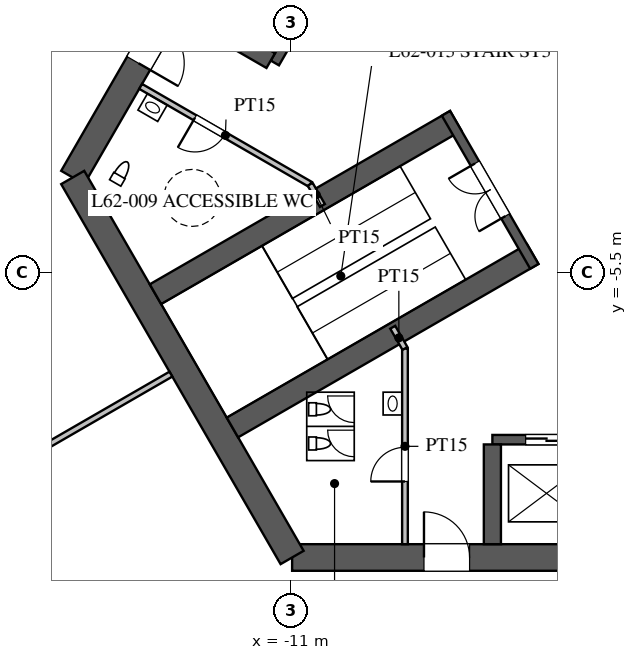
"""IFC4 building model, lengths in metres.
Left out: names, types, materials, properties, quantities, classifications, styles, units other than length and angle.
Written with IfcOpenShell. Run it as: python <this file> out.ifc"""

import sys

from ifc_helpers import new_model, si_unit, direction, frame, frame_2d, origin, place, context, subcontext, project, spatial, rectangle, extrude, element, fill, save


model = new_model("IFC4")
c1 = context("Model", 3, precision=1e-05, world=origin(), true_north=direction((0.0, 1.0)))
c2 = subcontext(c1, "Body", "Model", "MODEL_VIEW")
j1 = project(units=[si_unit("LENGTHUNIT", "METRE"), si_unit("PLANEANGLEUNIT", "RADIAN")], contexts=[c1])
p1 = place(None, origin())
s1 = spatial("IfcSite", under=j1, at=p1, CompositionType="ELEMENT")
p2 = place(p1, origin())
s2 = spatial("IfcBuilding", under=s1, at=p2, CompositionType="ELEMENT")
p3 = place(p2, frame((0.0, 0.0, 271.3)))
s3 = spatial("IfcBuildingStorey", under=s2, at=p3, CompositionType="ELEMENT", Elevation=271.3)
p4 = place(p3, frame((-10.97, -13.0, 0.0), z_axis=(0.0, 0.0, 1.0), x_axis=(1.0, 0.0, 0.0)))
e1 = element("IfcWall", 1, at=p4, inside=s3, PredefinedType="SHEAR", context=c2, shape_type="SweptSolid", body=[
    extrude(rectangle(XDim=21.939, YDim=0.7, at=frame_2d((10.97, 0.0))), origin(), (0.0, 0.0, 1.0), 5.0),
])
p5 = place(p4, frame((17.27, 0.0, 0.0)))
e2 = element("IfcOpeningElement", 2, at=p5, cuts=e1, PredefinedType="OPENING", context=c2, shape_type="SweptSolid", body=[
    extrude(rectangle(XDim=1.2, YDim=2.1, at=frame_2d((0.6, 1.05))), frame((0.0, 0.36, 0.0), z_axis=(0.0, -1.0, 0.0), x_axis=(1.0, 0.0, 0.0)), (0.0, 0.0, 1.0), 0.72),
])
p6 = place(p4, frame((3.47, 0.0, 0.0)))
e3 = element("IfcOpeningElement", 3, at=p6, cuts=e1, PredefinedType="OPENING", context=c2, shape_type="SweptSolid", body=[
    extrude(rectangle(XDim=1.2, YDim=2.1, at=frame_2d((0.6, 1.05))), frame((0.0, 0.36, 0.0), z_axis=(0.0, -1.0, 0.0), x_axis=(1.0, 0.0, 0.0)), (0.0, 0.0, 1.0), 0.72),
])
p7 = place(p3, frame((-5.773, 16.0, 0.0), z_axis=(0.0, 0.0, 1.0), x_axis=(-0.500002442456, -0.866023993627, 0.0)))
e4 = element("IfcWall", 4, at=p7, inside=s3, PredefinedType="SHEAR", context=c2, shape_type="SweptSolid", body=[
    extrude(rectangle(XDim=21.939, YDim=0.7, at=frame_2d((10.97, 0.0))), origin(), (0.0, 0.0, 1.0), 5.0),
])
p8 = place(p7, frame((17.27, 0.0, 0.0)))
e5 = element("IfcOpeningElement", 5, at=p8, cuts=e4, PredefinedType="OPENING", context=c2, shape_type="SweptSolid", body=[
    extrude(rectangle(XDim=1.2, YDim=2.1, at=frame_2d((0.6, 1.05))), frame((0.0, 0.36, 0.0), z_axis=(0.0, -1.0, 0.0), x_axis=(1.0, 0.0, 0.0)), (0.0, 0.0, 1.0), 0.72),
])
p9 = place(p7, frame((3.47, 0.0, 0.0)))
e6 = element("IfcOpeningElement", 6, at=p9, cuts=e4, PredefinedType="OPENING", context=c2, shape_type="SweptSolid", body=[
    extrude(rectangle(XDim=1.2, YDim=2.1, at=frame_2d((0.6, 1.05))), frame((0.0, 0.36, 0.0), z_axis=(0.0, -1.0, 0.0), x_axis=(1.0, 0.0, 0.0)), (0.0, 0.0, 1.0), 0.72),
])
p10 = place(p3, frame((-16.743, -3.0, 0.0), z_axis=(0.0, 0.0, 1.0), x_axis=(0.499995765644, -0.866027848477, 0.0)))
e7 = element("IfcWall", 7, at=p10, inside=s3, PredefinedType="SHEAR", context=c2, shape_type="SweptSolid", body=[
    extrude(rectangle(XDim=11.547, YDim=0.7, at=frame_2d((5.773, 0.0))), origin(), (0.0, 0.0, 1.0), 5.0),
])
p11 = place(p3, frame((-5.7, -9.9, 0.0), z_axis=(0.0, 0.0, 1.0), x_axis=(1.0, 0.0, 0.0)))
e8 = element("IfcWall", 8, at=p11, inside=s3, PredefinedType="SHEAR", context=c2, shape_type="SweptSolid", body=[
    extrude(rectangle(XDim=11.4, YDim=0.25, at=frame_2d((5.7, 0.0))), origin(), (0.0, 0.0, 1.0), 5.0),
])
p12 = place(p11, frame((0.875, 0.0, 0.0)))
e9 = element("IfcOpeningElement", 9, at=p12, cuts=e8, PredefinedType="OPENING", context=c2, shape_type="SweptSolid", body=[
    extrude(rectangle(XDim=1.1, YDim=2.2, at=frame_2d((0.55, 1.1))), frame((0.0, 0.135, 0.0), z_axis=(0.0, -1.0, 0.0), x_axis=(1.0, 0.0, 0.0)), (0.0, 0.0, 1.0), 0.27),
])
p13 = place(p11, frame((3.725, 0.0, 0.0)))
e10 = element("IfcOpeningElement", 10, at=p13, cuts=e8, PredefinedType="OPENING", context=c2, shape_type="SweptSolid", body=[
    extrude(rectangle(XDim=1.1, YDim=2.2, at=frame_2d((0.55, 1.1))), frame((0.0, 0.135, 0.0), z_axis=(0.0, -1.0, 0.0), x_axis=(1.0, 0.0, 0.0)), (0.0, 0.0, 1.0), 0.27),
])
p14 = place(p11, frame((6.575, 0.0, 0.0)))
e11 = element("IfcOpeningElement", 11, at=p14, cuts=e8, PredefinedType="OPENING", context=c2, shape_type="SweptSolid", body=[
    extrude(rectangle(XDim=1.1, YDim=2.2, at=frame_2d((0.55, 1.1))), frame((0.0, 0.135, 0.0), z_axis=(0.0, -1.0, 0.0), x_axis=(1.0, 0.0, 0.0)), (0.0, 0.0, 1.0), 0.27),
])
p15 = place(p11, frame((9.425, 0.0, 0.0)))
e12 = element("IfcOpeningElement", 12, at=p15, cuts=e8, PredefinedType="OPENING", context=c2, shape_type="SweptSolid", body=[
    extrude(rectangle(XDim=1.1, YDim=2.2, at=frame_2d((0.55, 1.1))), frame((0.0, 0.135, 0.0), z_axis=(0.0, -1.0, 0.0), x_axis=(1.0, 0.0, 0.0)), (0.0, 0.0, 1.0), 0.27),
])
p16 = place(p3, frame((-5.7, -10.025, 0.0), z_axis=(0.0, 0.0, 1.0), x_axis=(0.0, -1.0, 0.0)))
e13 = element("IfcWall", 13, at=p16, inside=s3, PredefinedType="SHEAR", context=c2, shape_type="SweptSolid", body=[
    extrude(rectangle(XDim=2.625, YDim=0.45, at=frame_2d((1.312, 0.0))), origin(), (0.0, 0.0, 1.0), 5.0),
])
p17 = place(p3, frame((-5.724, 9.886, 0.0), z_axis=(0.0, 0.0, 1.0), x_axis=(-0.500001763848, -0.866024385424, 0.0)))
e14 = element("IfcWall", 14, at=p17, inside=s3, PredefinedType="SHEAR", context=c2, shape_type="SweptSolid", body=[
    extrude(rectangle(XDim=11.4, YDim=0.25, at=frame_2d((5.7, 0.0))), origin(), (0.0, 0.0, 1.0), 5.0),
])
p18 = place(p17, frame((0.875, 0.0, 0.0)))
e15 = element("IfcOpeningElement", 15, at=p18, cuts=e14, PredefinedType="OPENING", context=c2, shape_type="SweptSolid", body=[
    extrude(rectangle(XDim=1.1, YDim=2.2, at=frame_2d((0.55, 1.1))), frame((0.0, 0.135, 0.0), z_axis=(0.0, -1.0, 0.0), x_axis=(1.0, 0.0, 0.0)), (0.0, 0.0, 1.0), 0.27),
])
p19 = place(p17, frame((3.725, 0.0, 0.0)))
e16 = element("IfcOpeningElement", 16, at=p19, cuts=e14, PredefinedType="OPENING", context=c2, shape_type="SweptSolid", body=[
    extrude(rectangle(XDim=1.1, YDim=2.2, at=frame_2d((0.55, 1.1))), frame((0.0, 0.135, 0.0), z_axis=(0.0, -1.0, 0.0), x_axis=(1.0, 0.0, 0.0)), (0.0, 0.0, 1.0), 0.27),
])
p20 = place(p17, frame((6.525, 0.0, 0.0)))
e17 = element("IfcOpeningElement", 17, at=p20, cuts=e14, PredefinedType="OPENING", context=c2, shape_type="SweptSolid", body=[
    extrude(rectangle(XDim=1.2, YDim=2.2, at=frame_2d((0.6, 1.1))), frame((0.0, 0.135, 0.0), z_axis=(0.0, -1.0, 0.0), x_axis=(1.0, 0.0, 0.0)), (0.0, 0.0, 1.0), 0.27),
])
p21 = place(p17, frame((9.375, 0.0, 0.0)))
e18 = element("IfcOpeningElement", 18, at=p21, cuts=e14, PredefinedType="OPENING", context=c2, shape_type="SweptSolid", body=[
    extrude(rectangle(XDim=1.2, YDim=2.2, at=frame_2d((0.6, 1.1))), frame((0.0, 0.135, 0.0), z_axis=(0.0, -1.0, 0.0), x_axis=(1.0, 0.0, 0.0)), (0.0, 0.0, 1.0), 0.27),
])
p22 = place(p3, frame((-11.532, 0.076, 0.0), z_axis=(0.0, 0.0, 1.0), x_axis=(-0.866013657776, 0.500020344131, 0.0)))
e19 = element("IfcWall", 19, at=p22, inside=s3, PredefinedType="SHEAR", context=c2, shape_type="SweptSolid", body=[
    extrude(rectangle(XDim=2.625, YDim=0.45, at=frame_2d((1.312, 0.0))), origin(), (0.0, 0.0, 1.0), 5.0),
])
for number, where, z_axis, x_axis in (
    (20, (-6.663, -1.509, 0.0), (0.0, 0.0, 1.0), (-0.866, -0.5, 0.0)),
    (21, (-4.638, -5.016, 0.0), (0.0, 0.0, 1.0), (-0.866, -0.5, 0.0)),
):
    element("IfcWall", number, at=place(p3, frame(where, z_axis=z_axis, x_axis=x_axis)), inside=s3, PredefinedType="SHEAR", context=c2, shape_type="SweptSolid", body=[
        extrude(rectangle(XDim=9.125, YDim=0.6, at=frame_2d((4.562, 0.0))), origin(), (0.0, 0.0, 1.0), 5.0),
    ])
p23 = place(p3, frame((-6.922, -1.312, 0.0), z_axis=(0.0, 0.0, 1.0), x_axis=(0.499984536904, -0.866034331223, 0.0)))
e22 = element("IfcWall", 22, at=p23, inside=s3, PredefinedType="SHEAR", context=c2, shape_type="SweptSolid", body=[
    extrude(rectangle(XDim=4.65, YDim=0.25, at=frame_2d((2.325, 0.0))), origin(), (0.0, 0.0, 1.0), 5.0),
])
p24 = place(p23, frame((1.525, 0.0, 0.0)))
e23 = element("IfcOpeningElement", 23, at=p24, cuts=e22, PredefinedType="OPENING", context=c2, shape_type="SweptSolid", body=[
    extrude(rectangle(XDim=1.6, YDim=2.1, at=frame_2d((0.8, 1.05))), frame((0.0, 0.135, 0.0), z_axis=(0.0, -1.0, 0.0), x_axis=(1.0, 0.0, 0.0)), (0.0, 0.0, 1.0), 0.27),
])
p25 = place(p3, frame((-8.0, -7.5, 0.0), z_axis=(0.0, 0.0, 1.0), x_axis=(0.0, -1.0, 0.0)))
e24 = element("IfcWall", 24, at=p25, inside=s3, PredefinedType="PARTITIONING", context=c2, shape_type="SweptSolid", body=[
    extrude(rectangle(XDim=5.15, YDim=0.15, at=frame_2d((2.575, 0.0))), origin(), (0.0, 0.0, 1.0), 4.8),
])
p26 = place(p25, frame((2.6, 0.0, 0.0)))
e25 = element("IfcOpeningElement", 25, at=p26, cuts=e24, PredefinedType="OPENING", context=c2, shape_type="SweptSolid", body=[
    extrude(rectangle(XDim=0.9, YDim=2.1, at=frame_2d((0.45, 1.05))), frame((0.0, 0.085, 0.0), z_axis=(0.0, -1.0, 0.0), x_axis=(1.0, 0.0, 0.0)), (0.0, 0.0, 1.0), 0.17),
])
p27 = place(p3, frame((-10.495, -3.178, 0.0), z_axis=(0.0, 0.0, 1.0), x_axis=(-0.866037967349, 0.499978238636, 0.0)))
e26 = element("IfcWall", 26, at=p27, inside=s3, PredefinedType="PARTITIONING", context=c2, shape_type="SweptSolid", body=[
    extrude(rectangle(XDim=5.15, YDim=0.15, at=frame_2d((2.575, 0.0))), origin(), (0.0, 0.0, 1.0), 4.8),
])
p28 = place(p27, frame((2.6, 0.0, 0.0)))
e27 = element("IfcOpeningElement", 27, at=p28, cuts=e26, PredefinedType="OPENING", context=c2, shape_type="SweptSolid", body=[
    extrude(rectangle(XDim=0.9, YDim=2.1, at=frame_2d((0.45, 1.05))), frame((0.0, 0.085, 0.0), z_axis=(0.0, -1.0, 0.0), x_axis=(1.0, 0.0, 0.0)), (0.0, 0.0, 1.0), 0.17),
])
for number, where, z_axis, x_axis in (
    (28, (-10.495, -3.178, 0.0), (0.0, 0.0, 1.0), (0.5, -0.866, 0.0)),
    (29, (-8.0, -7.5, 0.0), (0.0, 0.0, 1.0), (-0.5, 0.866, 0.0)),
):
    element("IfcWall", number, at=place(p3, frame(where, z_axis=z_axis, x_axis=x_axis)), inside=s3, PredefinedType="PARTITIONING", context=c2, shape_type="SweptSolid", body=[
        extrude(rectangle(XDim=0.645, YDim=0.15, at=frame_2d((0.323, 0.0))), origin(), (0.0, 0.0, 1.0), 4.8),
    ])
p29 = place(p3, frame((-14.159, -8.175, 0.0), z_axis=(0.0, 0.0, 1.0), x_axis=(-0.866026905467, -0.499997399001, 0.0)))
e30 = element("IfcWall", 30, at=p29, inside=s3, PredefinedType="PARTITIONING", context=c2, shape_type="SweptSolid", body=[
    extrude(rectangle(XDim=13.4, YDim=0.15, at=frame_2d((6.7, 0.0))), origin(), (0.0, 0.0, 1.0), 3.3),
])
p30 = place(p26, frame((0.9, 0.0, 0.0), z_axis=(0.0, 0.0, 1.0), x_axis=(-1.0, 0.0, 0.0)))
e31 = element("IfcDoor", 31, at=p30, inside=s3, OperationType="SINGLE_SWING_LEFT", PredefinedType="DOOR", context=c2, shape_type="SweptSolid", body=[
    extrude(rectangle(XDim=0.9, YDim=2.1, at=frame_2d((0.45, 1.05))), frame((0.0, 0.025, 0.0), z_axis=(0.0, -1.0, 0.0), x_axis=(1.0, 0.0, 0.0)), (0.0, 0.0, 1.0), 0.05),
])
fill(e25, e31)
p31 = place(p28, origin())
e32 = element("IfcDoor", 32, at=p31, inside=s3, OperationType="SINGLE_SWING_RIGHT", PredefinedType="DOOR", context=c2, shape_type="SweptSolid", body=[
    extrude(rectangle(XDim=0.9, YDim=2.1, at=frame_2d((0.45, 1.05))), frame((0.0, 0.025, 0.0), z_axis=(0.0, -1.0, 0.0), x_axis=(1.0, 0.0, 0.0)), (0.0, 0.0, 1.0), 0.05),
])
fill(e27, e32)
p32 = place(p24, frame((1.6, 0.0, 0.0), z_axis=(0.0, 0.0, 1.0), x_axis=(-1.0, 0.0, 0.0)))
e33 = element("IfcDoor", 33, at=p32, inside=s3, OperationType="DOUBLE_DOOR_SINGLE_SWING", PredefinedType="DOOR", context=c2, shape_type="SweptSolid", body=[
    extrude(rectangle(XDim=1.6, YDim=2.1, at=frame_2d((0.8, 1.05))), frame((0.0, 0.025, 0.0), z_axis=(0.0, -1.0, 0.0), x_axis=(1.0, 0.0, 0.0)), (0.0, 0.0, 1.0), 0.05),
])
fill(e23, e33)
p33 = place(p6, origin())
e34 = element("IfcDoor", 34, at=p33, inside=s3, OperationType="SINGLE_SWING_LEFT", PredefinedType="DOOR", context=c2, shape_type="SweptSolid", body=[
    extrude(rectangle(XDim=1.2, YDim=2.1, at=frame_2d((0.6, 1.05))), frame((0.0, 0.025, 0.0), z_axis=(0.0, -1.0, 0.0), x_axis=(1.0, 0.0, 0.0)), (0.0, 0.0, 1.0), 0.05),
])
fill(e3, e34)
p34 = place(p8, origin())
e35 = element("IfcDoor", 35, at=p34, inside=s3, OperationType="SINGLE_SWING_RIGHT", PredefinedType="DOOR", context=c2, shape_type="SweptSolid", body=[
    extrude(rectangle(XDim=1.2, YDim=2.1, at=frame_2d((0.6, 1.05))), frame((0.0, 0.025, 0.0), z_axis=(0.0, -1.0, 0.0), x_axis=(1.0, 0.0, 0.0)), (0.0, 0.0, 1.0), 0.05),
])
fill(e5, e35)
p35 = place(p12, origin())
e36 = element("IfcDoor", 36, at=p35, inside=s3, OperationType="DOUBLE_DOOR_SLIDING", PredefinedType="DOOR", context=c2, shape_type="SweptSolid", body=[
    extrude(rectangle(XDim=1.1, YDim=2.2, at=frame_2d((0.55, 1.1))), frame((0.0, 0.025, 0.0), z_axis=(0.0, -1.0, 0.0), x_axis=(1.0, 0.0, 0.0)), (0.0, 0.0, 1.0), 0.05),
])
fill(e9, e36)
save(model, sys.argv[1])
